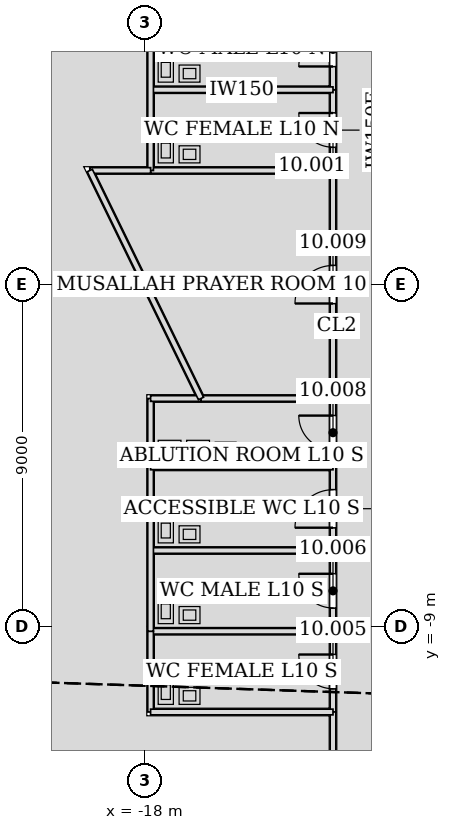
"""IFC4 building model, lengths in metres.
Left out: names, types, materials, properties, quantities, classifications, styles, units other than length and angle.
Written with IfcOpenShell. Run it as: python <this file> out.ifc"""

import sys

from ifc_helpers import new_model, si_unit, direction, frame, frame_2d, origin, place, context, subcontext, project, spatial, rectangle, extrude, element, fill, save


model = new_model("IFC4")
c1 = context("Model", 3, precision=1e-05, world=origin(), true_north=direction((0.0, 1.0)))
c2 = subcontext(c1, "Body", "Model", "MODEL_VIEW")
j1 = project(units=[si_unit("LENGTHUNIT", "METRE"), si_unit("PLANEANGLEUNIT", "RADIAN")], contexts=[c1])
p1 = place(None, origin())
s1 = spatial("IfcSite", under=j1, at=p1, CompositionType="ELEMENT")
p2 = place(p1, origin())
s2 = spatial("IfcBuilding", under=s1, at=p2, CompositionType="ELEMENT")
p3 = place(p2, frame((0.0, 0.0, 49.8)))
s3 = spatial("IfcBuildingStorey", under=s2, at=p3, CompositionType="ELEMENT", Elevation=49.8)
p4 = place(p3, frame((-13.05, 5.126, 0.0), z_axis=(0.0, 0.0, 1.0), x_axis=(0.0, -1.0, 0.0)))
e1 = element("IfcWall", 1, at=p4, inside=s3, PredefinedType="PARTITIONING", context=c2, shape_type="SweptSolid", body=[
    extrude(rectangle(XDim=2.127, YDim=0.15, at=frame_2d((1.063, 0.0))), origin(), (0.0, 0.0, 1.0), 4.035),
])
p5 = place(p4, frame((0.614, 0.0, 0.0)))
e2 = element("IfcOpeningElement", 2, at=p5, cuts=e1, PredefinedType="OPENING", context=c2, shape_type="SweptSolid", body=[
    extrude(rectangle(XDim=0.9, YDim=2.1, at=frame_2d((0.45, 1.05))), frame((0.0, 0.085, 0.0), z_axis=(0.0, -1.0, 0.0), x_axis=(1.0, 0.0, 0.0)), (0.0, 0.0, 1.0), 0.17),
])
p6 = place(p3, frame((-13.05, 7.251, 0.0), z_axis=(0.0, 0.0, 1.0), x_axis=(0.0, -1.0, 0.0)))
e3 = element("IfcWall", 3, at=p6, inside=s3, PredefinedType="PARTITIONING", context=c2, shape_type="SweptSolid", body=[
    extrude(rectangle(XDim=2.127, YDim=0.15, at=frame_2d((1.063, 0.0))), origin(), (0.0, 0.0, 1.0), 4.035),
])
p7 = place(p6, frame((0.614, 0.0, 0.0)))
e4 = element("IfcOpeningElement", 4, at=p7, cuts=e3, PredefinedType="OPENING", context=c2, shape_type="SweptSolid", body=[
    extrude(rectangle(XDim=0.9, YDim=2.1, at=frame_2d((0.45, 1.05))), frame((0.0, 0.085, 0.0), z_axis=(0.0, -1.0, 0.0), x_axis=(1.0, 0.0, 0.0)), (0.0, 0.0, 1.0), 0.17),
])
p8 = place(p3, frame((-13.05, -9.124, 0.0), z_axis=(0.0, 0.0, 1.0), x_axis=(0.0, -1.0, 0.0)))
e5 = element("IfcWall", 5, at=p8, inside=s3, PredefinedType="PARTITIONING", context=c2, shape_type="SweptSolid", body=[
    extrude(rectangle(XDim=2.127, YDim=0.15, at=frame_2d((1.063, 0.0))), origin(), (0.0, 0.0, 1.0), 3.014),
])
p9 = place(p8, frame((0.614, 0.0, 0.0)))
e6 = element("IfcOpeningElement", 6, at=p9, cuts=e5, PredefinedType="OPENING", context=c2, shape_type="SweptSolid", body=[
    extrude(rectangle(XDim=0.9, YDim=2.1, at=frame_2d((0.45, 1.05))), frame((0.0, 0.085, 0.0), z_axis=(0.0, -1.0, 0.0), x_axis=(1.0, 0.0, 0.0)), (0.0, 0.0, 1.0), 0.17),
])
p10 = place(p3, frame((-13.05, -6.999, 0.0), z_axis=(0.0, 0.0, 1.0), x_axis=(0.0, -1.0, 0.0)))
e7 = element("IfcWall", 7, at=p10, inside=s3, PredefinedType="PARTITIONING", context=c2, shape_type="SweptSolid", body=[
    extrude(rectangle(XDim=2.127, YDim=0.15, at=frame_2d((1.063, 0.0))), origin(), (0.0, 0.0, 1.0), 4.035),
])
p11 = place(p10, frame((0.614, 0.0, 0.0)))
e8 = element("IfcOpeningElement", 8, at=p11, cuts=e7, PredefinedType="OPENING", context=c2, shape_type="SweptSolid", body=[
    extrude(rectangle(XDim=0.9, YDim=2.1, at=frame_2d((0.45, 1.05))), frame((0.0, 0.085, 0.0), z_axis=(0.0, -1.0, 0.0), x_axis=(1.0, 0.0, 0.0)), (0.0, 0.0, 1.0), 0.17),
])
p12 = place(p3, frame((-13.05, -4.799, 0.0), z_axis=(0.0, 0.0, 1.0), x_axis=(0.0, -1.0, 0.0)))
e9 = element("IfcWall", 9, at=p12, inside=s3, PredefinedType="PARTITIONING", context=c2, shape_type="SweptSolid", body=[
    extrude(rectangle(XDim=2.202, YDim=0.15, at=frame_2d((1.101, 0.0))), origin(), (0.0, 0.0, 1.0), 4.035),
])
p13 = place(p12, frame((0.601, 0.0, 0.0)))
e10 = element("IfcOpeningElement", 10, at=p13, cuts=e9, PredefinedType="OPENING", context=c2, shape_type="SweptSolid", body=[
    extrude(rectangle(XDim=1.0, YDim=2.1, at=frame_2d((0.5, 1.05))), frame((0.0, 0.085, 0.0), z_axis=(0.0, -1.0, 0.0), x_axis=(1.0, 0.0, 0.0)), (0.0, 0.0, 1.0), 0.17),
])
p14 = place(p3, frame((-13.05, -2.999, 0.0), z_axis=(0.0, 0.0, 1.0), x_axis=(0.0, -1.0, 0.0)))
e11 = element("IfcWall", 11, at=p14, inside=s3, PredefinedType="PARTITIONING", context=c2, shape_type="SweptSolid", body=[
    extrude(rectangle(XDim=1.802, YDim=0.15, at=frame_2d((0.901, 0.0))), origin(), (0.0, 0.0, 1.0), 4.035),
])
p15 = place(p14, frame((0.451, 0.0, 0.0)))
e12 = element("IfcOpeningElement", 12, at=p15, cuts=e11, PredefinedType="OPENING", context=c2, shape_type="SweptSolid", body=[
    extrude(rectangle(XDim=0.9, YDim=2.1, at=frame_2d((0.45, 1.05))), frame((0.0, 0.085, 0.0), z_axis=(0.0, -1.0, 0.0), x_axis=(1.0, 0.0, 0.0)), (0.0, 0.0, 1.0), 0.17),
])
p16 = place(p3, frame((-13.05, 3.001, 0.0), z_axis=(0.0, 0.0, 1.0), x_axis=(0.0, -1.0, 0.0)))
e13 = element("IfcWall", 13, at=p16, inside=s3, PredefinedType="PARTITIONING", context=c2, shape_type="SweptSolid", body=[
    extrude(rectangle(XDim=6.002, YDim=0.15, at=frame_2d((3.001, 0.0))), origin(), (0.0, 0.0, 1.0), 2.984),
])
p17 = place(p16, frame((2.501, 0.0, 0.0)))
e14 = element("IfcOpeningElement", 14, at=p17, cuts=e13, PredefinedType="OPENING", context=c2, shape_type="SweptSolid", body=[
    extrude(rectangle(XDim=1.0, YDim=2.1, at=frame_2d((0.5, 1.05))), frame((0.0, 0.085, 0.0), z_axis=(0.0, -1.0, 0.0), x_axis=(1.0, 0.0, 0.0)), (0.0, 0.0, 1.0), 0.17),
])
p18 = place(p3, frame((-13.05, -11.249, 0.0), z_axis=(0.0, 0.0, 1.0), x_axis=(0.0, -1.0, 0.0)))
e15 = element("IfcWall", 15, at=p18, inside=s3, PredefinedType="PARTITIONING", context=c2, shape_type="SweptSolid", body=[
    extrude(rectangle(XDim=1.801, YDim=0.15, at=frame_2d((0.9, 0.0))), origin(), (0.0, 0.0, 1.0), 3.098),
])
for number, where, z_axis, x_axis in (
    (16, (-13.05, 5.125, 0.0), (0.0, 0.0, 1.0), (-1.0, 0.0, 0.0)),
    (17, (-17.85, 3.0, 0.0), (0.0, 0.0, 1.0), (1.0, 0.0, 0.0)),
):
    element("IfcWall", number, at=place(p3, frame(where, z_axis=z_axis, x_axis=x_axis)), inside=s3, PredefinedType="PARTITIONING", context=c2, shape_type="SweptSolid", body=[
        extrude(rectangle(XDim=4.8, YDim=0.15, at=frame_2d((2.4, 0.0))), origin(), (0.0, 0.0, 1.0), 3.423),
    ])
p19 = place(p3, frame((-17.85, 3.0, 0.0), z_axis=(0.0, 0.0, 1.0), x_axis=(0.0, 1.0, 0.0)))
e18 = element("IfcWall", 18, at=p19, inside=s3, PredefinedType="PARTITIONING", context=c2, shape_type="SweptSolid", body=[
    extrude(rectangle(XDim=6.45, YDim=0.15, at=frame_2d((3.225, 0.0))), origin(), (0.0, 0.0, 1.0), 4.035),
])
p20 = place(p3, frame((-13.05, -9.125, 0.0), z_axis=(0.0, 0.0, 1.0), x_axis=(-1.0, 0.0, 0.0)))
e19 = element("IfcWall", 19, at=p20, inside=s3, PredefinedType="PARTITIONING", context=c2, shape_type="SweptSolid", body=[
    extrude(rectangle(XDim=4.8, YDim=0.15, at=frame_2d((2.4, 0.0))), origin(), (0.0, 0.0, 1.0), 3.423),
])
p21 = place(p3, frame((-17.85, -9.125, 0.0), z_axis=(0.0, 0.0, 1.0), x_axis=(0.0, -1.0, 0.0)))
e20 = element("IfcWall", 20, at=p21, inside=s3, PredefinedType="PARTITIONING", context=c2, shape_type="SweptSolid", body=[
    extrude(rectangle(XDim=2.125, YDim=0.15, at=frame_2d((1.062, 0.0))), origin(), (0.0, 0.0, 1.0), 3.014),
])
p22 = place(p3, frame((-17.85, -11.25, 0.0), z_axis=(0.0, 0.0, 1.0), x_axis=(1.0, 0.0, 0.0)))
e21 = element("IfcWall", 21, at=p22, inside=s3, PredefinedType="PARTITIONING", context=c2, shape_type="SweptSolid", body=[
    extrude(rectangle(XDim=4.8, YDim=0.15, at=frame_2d((2.4, 0.0))), origin(), (0.0, 0.0, 1.0), 3.715),
])
p23 = place(p3, frame((-13.05, -7.0, 0.0), z_axis=(0.0, 0.0, 1.0), x_axis=(-1.0, 0.0, 0.0)))
e22 = element("IfcWall", 22, at=p23, inside=s3, PredefinedType="PARTITIONING", context=c2, shape_type="SweptSolid", body=[
    extrude(rectangle(XDim=4.8, YDim=0.15, at=frame_2d((2.4, 0.0))), origin(), (0.0, 0.0, 1.0), 3.423),
])
p24 = place(p3, frame((-17.85, -9.125, 0.0), z_axis=(0.0, 0.0, 1.0), x_axis=(0.0, 1.0, 0.0)))
e23 = element("IfcWall", 23, at=p24, inside=s3, PredefinedType="PARTITIONING", context=c2, shape_type="SweptSolid", body=[
    extrude(rectangle(XDim=6.125, YDim=0.15, at=frame_2d((3.062, 0.0))), origin(), (0.0, 0.0, 1.0), 4.035),
])
p25 = place(p3, frame((-13.05, -4.8, 0.0), z_axis=(0.0, 0.0, 1.0), x_axis=(-1.0, 0.0, 0.0)))
e24 = element("IfcWall", 24, at=p25, inside=s3, PredefinedType="PARTITIONING", context=c2, shape_type="SweptSolid", body=[
    extrude(rectangle(XDim=4.8, YDim=0.15, at=frame_2d((2.4, 0.0))), origin(), (0.0, 0.0, 1.0), 3.423),
])
p26 = place(p3, frame((-13.05, -3.0, 0.0), z_axis=(0.0, 0.0, 1.0), x_axis=(-1.0, 0.0, 0.0)))
e25 = element("IfcWall", 25, at=p26, inside=s3, PredefinedType="PARTITIONING", context=c2, shape_type="SweptSolid", body=[
    extrude(rectangle(XDim=3.475, YDim=0.15, at=frame_2d((1.737, 0.0))), origin(), (0.0, 0.0, 1.0), 3.423),
])
p27 = place(p3, frame((-16.522, -3.0, 0.0), z_axis=(0.0, 0.0, 1.0), x_axis=(-1.0, 0.0, 0.0)))
e26 = element("IfcWall", 26, at=p27, inside=s3, PredefinedType="PARTITIONING", context=c2, shape_type="SweptSolid", body=[
    extrude(rectangle(XDim=1.328, YDim=0.15, at=frame_2d((0.664, 0.0))), origin(), (0.0, 0.0, 1.0), 3.426),
])
p28 = place(p3, frame((-17.849, 3.0, 0.0), z_axis=(0.0, 0.0, 1.0), x_axis=(-1.0, 0.0, 0.0)))
e27 = element("IfcWall", 27, at=p28, inside=s3, PredefinedType="PARTITIONING", context=c2, shape_type="SweptSolid", body=[
    extrude(rectangle(XDim=1.601, YDim=0.15, at=frame_2d((0.8, 0.0))), origin(), (0.0, 0.0, 1.0), 4.035),
])
p29 = place(p3, frame((-19.45, 3.0, 0.0), z_axis=(0.0, 0.0, 1.0), x_axis=(0.43835589904, -0.898801482963, 0.0)))
e28 = element("IfcWall", 28, at=p29, inside=s3, PredefinedType="PARTITIONING", context=c2, shape_type="SweptSolid", body=[
    extrude(rectangle(XDim=6.676, YDim=0.15, at=frame_2d((3.338, 0.0))), origin(), (0.0, 0.0, 1.0), 2.984),
])
p30 = place(p5, frame((0.9, 0.0, 0.0), z_axis=(0.0, 0.0, 1.0), x_axis=(-1.0, 0.0, 0.0)))
e29 = element("IfcDoor", 29, at=p30, inside=s3, OperationType="SINGLE_SWING_RIGHT", PredefinedType="DOOR", context=c2, shape_type="SweptSolid", body=[
    extrude(rectangle(XDim=0.9, YDim=2.1, at=frame_2d((0.45, 1.05))), frame((0.0, 0.025, 0.0), z_axis=(0.0, -1.0, 0.0), x_axis=(1.0, 0.0, 0.0)), (0.0, 0.0, 1.0), 0.05),
])
fill(e2, e29)
p31 = place(p7, frame((0.9, 0.0, 0.0), z_axis=(0.0, 0.0, 1.0), x_axis=(-1.0, 0.0, 0.0)))
e30 = element("IfcDoor", 30, at=p31, inside=s3, OperationType="SINGLE_SWING_LEFT", PredefinedType="DOOR", context=c2, shape_type="SweptSolid", body=[
    extrude(rectangle(XDim=0.9, YDim=2.1, at=frame_2d((0.45, 1.05))), frame((0.0, 0.025, 0.0), z_axis=(0.0, -1.0, 0.0), x_axis=(1.0, 0.0, 0.0)), (0.0, 0.0, 1.0), 0.05),
])
fill(e4, e30)
p32 = place(p9, frame((0.9, 0.0, 0.0), z_axis=(0.0, 0.0, 1.0), x_axis=(-1.0, 0.0, 0.0)))
e31 = element("IfcDoor", 31, at=p32, inside=s3, OperationType="SINGLE_SWING_RIGHT", PredefinedType="DOOR", context=c2, shape_type="SweptSolid", body=[
    extrude(rectangle(XDim=0.9, YDim=2.1, at=frame_2d((0.45, 1.05))), frame((0.0, 0.025, 0.0), z_axis=(0.0, -1.0, 0.0), x_axis=(1.0, 0.0, 0.0)), (0.0, 0.0, 1.0), 0.05),
])
fill(e6, e31)
p33 = place(p11, frame((0.9, 0.0, 0.0), z_axis=(0.0, 0.0, 1.0), x_axis=(-1.0, 0.0, 0.0)))
e32 = element("IfcDoor", 32, at=p33, inside=s3, OperationType="SINGLE_SWING_RIGHT", PredefinedType="DOOR", context=c2, shape_type="SweptSolid", body=[
    extrude(rectangle(XDim=0.9, YDim=2.1, at=frame_2d((0.45, 1.05))), frame((0.0, 0.025, 0.0), z_axis=(0.0, -1.0, 0.0), x_axis=(1.0, 0.0, 0.0)), (0.0, 0.0, 1.0), 0.05),
])
fill(e8, e32)
p34 = place(p13, frame((1.0, 0.0, 0.0), z_axis=(0.0, 0.0, 1.0), x_axis=(-1.0, 0.0, 0.0)))
e33 = element("IfcDoor", 33, at=p34, inside=s3, OperationType="SINGLE_SWING_LEFT", PredefinedType="DOOR", context=c2, shape_type="SweptSolid", body=[
    extrude(rectangle(XDim=1.0, YDim=2.1, at=frame_2d((0.5, 1.05))), frame((0.0, 0.025, 0.0), z_axis=(0.0, -1.0, 0.0), x_axis=(1.0, 0.0, 0.0)), (0.0, 0.0, 1.0), 0.05),
])
fill(e10, e33)
p35 = place(p15, frame((0.9, 0.0, 0.0), z_axis=(0.0, 0.0, 1.0), x_axis=(-1.0, 0.0, 0.0)))
e34 = element("IfcDoor", 34, at=p35, inside=s3, OperationType="SINGLE_SWING_RIGHT", PredefinedType="DOOR", context=c2, shape_type="SweptSolid", body=[
    extrude(rectangle(XDim=0.9, YDim=2.1, at=frame_2d((0.45, 1.05))), frame((0.0, 0.025, 0.0), z_axis=(0.0, -1.0, 0.0), x_axis=(1.0, 0.0, 0.0)), (0.0, 0.0, 1.0), 0.05),
])
fill(e12, e34)
p36 = place(p17, frame((1.0, 0.0, 0.0), z_axis=(0.0, 0.0, 1.0), x_axis=(-1.0, 0.0, 0.0)))
e35 = element("IfcDoor", 35, at=p36, inside=s3, OperationType="SINGLE_SWING_LEFT", PredefinedType="DOOR", context=c2, shape_type="SweptSolid", body=[
    extrude(rectangle(XDim=1.0, YDim=2.1, at=frame_2d((0.5, 1.05))), frame((0.0, 0.025, 0.0), z_axis=(0.0, -1.0, 0.0), x_axis=(1.0, 0.0, 0.0)), (0.0, 0.0, 1.0), 0.05),
])
fill(e14, e35)
save(model, sys.argv[1])
